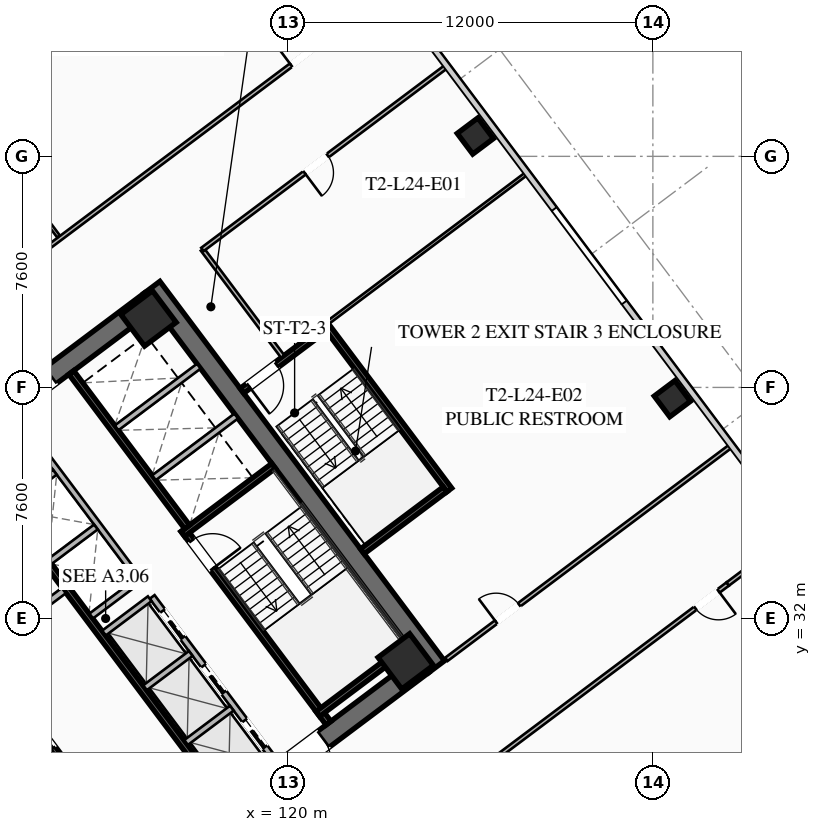
"""IFC4 building model, lengths in metres.
Left out: names, types, materials, properties, quantities, classifications, styles, units other than length and angle.
Written with IfcOpenShell. Run it as: python <this file> out.ifc"""

import sys

from ifc_helpers import new_model, si_unit, direction, frame, frame_2d, origin, origin_2d, place, context, subcontext, project, spatial, rectangle, hollow_rectangle, extrude, element, fill, save


model = new_model("IFC4")
c1 = context("Model", 3, precision=1e-05, world=origin(), true_north=direction((0.0, 1.0)))
c2 = subcontext(c1, "Body", "Model", "MODEL_VIEW")
j1 = project(units=[si_unit("LENGTHUNIT", "METRE"), si_unit("PLANEANGLEUNIT", "RADIAN")], contexts=[c1])
p1 = place(None, origin())
s1 = spatial("IfcSite", under=j1, at=p1, CompositionType="ELEMENT")
p2 = place(p1, origin())
s2 = spatial("IfcBuilding", under=s1, at=p2, CompositionType="ELEMENT")
p3 = place(p2, frame((0.0, 0.0, 92.05)))
s3 = spatial("IfcBuildingStorey", under=s2, at=p3, CompositionType="ELEMENT", Elevation=92.05)
for number, where, z_axis, x_axis in (
    (1, (112.476, 21.107, 0.0), (0.0, 0.0, 1.0), (-0.6, 0.8, 0.0)),
    (2, (115.524, 42.893, 0.0), (0.0, 0.0, 1.0), (0.6, -0.8, 0.0)),
):
    element("IfcWall", number, at=place(p3, frame(where, z_axis=z_axis, x_axis=x_axis)), inside=s3, PredefinedType="SHEAR", context=c2, shape_type="SweptSolid", body=[
        extrude(rectangle(XDim=15.6, YDim=0.65, at=frame_2d((7.8, 0.0))), origin(), (0.0, 0.0, 1.0), 3.55),
    ])
p4 = place(p3, frame((124.429, 30.478, 0.0), z_axis=(0.0, 0.0, 1.0), x_axis=(-0.799998028465, -0.600002628705, 0.0)))
e3 = element("IfcWall", 3, at=p4, inside=s3, PredefinedType="SHEAR", context=c2, shape_type="SweptSolid", body=[
    extrude(rectangle(XDim=14.86, YDim=0.65, at=frame_2d((7.43, 0.0))), origin(), (0.0, 0.0, 1.0), 3.55),
])
p5 = place(p4, frame((9.13, 0.0, 0.0)))
e4 = element("IfcOpeningElement", 4, at=p5, cuts=e3, PredefinedType="OPENING", context=c2, shape_type="SweptSolid", body=[
    extrude(rectangle(XDim=1.25, YDim=2.25, at=frame_2d((0.625, 1.125))), frame((0.0, 0.335, 0.0), z_axis=(0.0, -1.0, 0.0), x_axis=(1.0, 0.0, 0.0)), (0.0, 0.0, 1.0), 0.67),
])
p6 = place(p4, frame((4.08, 0.0, 0.0)))
e5 = element("IfcOpeningElement", 5, at=p6, cuts=e3, PredefinedType="OPENING", context=c2, shape_type="SweptSolid", body=[
    extrude(rectangle(XDim=1.25, YDim=2.25, at=frame_2d((0.625, 1.125))), frame((0.0, 0.335, 0.0), z_axis=(0.0, -1.0, 0.0), x_axis=(1.0, 0.0, 0.0)), (0.0, 0.0, 1.0), 0.67),
])
p7 = place(p3, frame((103.571, 33.522, 0.0), z_axis=(0.0, 0.0, 1.0), x_axis=(0.799998028465, 0.600002628705, 0.0)))
e6 = element("IfcWall", 6, at=p7, inside=s3, PredefinedType="SHEAR", context=c2, shape_type="SweptSolid", body=[
    extrude(rectangle(XDim=14.86, YDim=0.65, at=frame_2d((7.43, 0.0))), origin(), (0.0, 0.0, 1.0), 3.55),
])
p8 = place(p7, frame((4.48, 0.0, 0.0)))
e7 = element("IfcOpeningElement", 7, at=p8, cuts=e6, PredefinedType="OPENING", context=c2, shape_type="SweptSolid", body=[
    extrude(rectangle(XDim=1.25, YDim=2.25, at=frame_2d((0.625, 1.125))), frame((0.0, 0.335, 0.0), z_axis=(0.0, -1.0, 0.0), x_axis=(1.0, 0.0, 0.0)), (0.0, 0.0, 1.0), 0.67),
])
p9 = place(p7, frame((9.53, 0.0, 0.0)))
e8 = element("IfcOpeningElement", 8, at=p9, cuts=e6, PredefinedType="OPENING", context=c2, shape_type="SweptSolid", body=[
    extrude(rectangle(XDim=1.25, YDim=2.25, at=frame_2d((0.625, 1.125))), frame((0.0, 0.335, 0.0), z_axis=(0.0, -1.0, 0.0), x_axis=(1.0, 0.0, 0.0)), (0.0, 0.0, 1.0), 0.67),
])
for number, where, z_axis, x_axis in (
    (9, (123.87, 30.59, 0.0), (0.0, 0.0, 1.0), (0.8, 0.6, 0.0)),
    (10, (115.41, 41.87, 0.0), (0.0, 0.0, 1.0), (0.8, 0.6, 0.0)),
):
    element("IfcColumn", number, at=place(p3, frame(where, z_axis=z_axis, x_axis=x_axis)), inside=s3, PredefinedType="COLUMN", context=c2, shape_type="SweptSolid", body=[
        extrude(hollow_rectangle(XDim=1.3, YDim=1.3, WallThickness=0.05, at=origin_2d()), origin(), (0.0, 0.0, 1.0), 3.35),
    ])
for number, where, z_axis, x_axis in (
    (11, (132.64, 39.23, 0.0), (0.0, 0.0, 1.0), (0.8, 0.6, 0.0)),
    (12, (126.16, 47.87, 0.0), (0.0, 0.0, 1.0), (0.8, 0.6, 0.0)),
):
    element("IfcColumn", number, at=place(p3, frame(where, z_axis=z_axis, x_axis=x_axis)), inside=s3, PredefinedType="COLUMN", context=c2, shape_type="SweptSolid", body=[
        extrude(hollow_rectangle(XDim=0.85, YDim=0.85, WallThickness=0.035, at=origin_2d()), origin(), (0.0, 0.0, 1.0), 3.35),
    ])
p10 = place(p3, frame((116.56, 34.92, 0.0), z_axis=(0.0, 0.0, 1.0), x_axis=(0.600009827119, -0.799992629566, 0.0)))
e13 = element("IfcWall", 13, at=p10, inside=s3, PredefinedType="SHEAR", context=c2, shape_type="SweptSolid", body=[
    extrude(rectangle(XDim=7.95, YDim=0.2, at=frame_2d((3.975, 0.0))), origin(), (0.0, 0.0, 1.0), 3.35),
])
p11 = place(p10, frame((0.45, 0.0, 0.0)))
e14 = element("IfcOpeningElement", 14, at=p11, cuts=e13, PredefinedType="OPENING", context=c2, shape_type="SweptSolid", body=[
    extrude(rectangle(XDim=1.15, YDim=2.2, at=frame_2d((0.575, 1.1))), frame((0.0, 0.11, 0.0), z_axis=(0.0, -1.0, 0.0), x_axis=(1.0, 0.0, 0.0)), (0.0, 0.0, 1.0), 0.22),
])
for number, where, z_axis, x_axis in (
    (15, (116.54, 34.78, 0.0), (0.0, 0.0, 1.0), (0.8, 0.6, 0.0)),
    (16, (120.98, 28.86, 0.0), (0.0, 0.0, 1.0), (0.8, 0.6, 0.0)),
):
    element("IfcWall", number, at=place(p3, frame(where, z_axis=z_axis, x_axis=x_axis)), inside=s3, PredefinedType="SHEAR", context=c2, shape_type="SweptSolid", body=[
        extrude(rectangle(XDim=3.73, YDim=0.2, at=frame_2d((1.865, 0.0))), origin(), (0.0, 0.0, 1.0), 3.35),
    ])
p12 = place(p3, frame((117.938, 26.016, 0.0), z_axis=(0.0, 0.0, 1.0), x_axis=(-0.600005463273, 0.799995902516, 0.0)))
e17 = element("IfcWall", 17, at=p12, inside=s3, PredefinedType="SHEAR", context=c2, shape_type="SweptSolid", body=[
    extrude(rectangle(XDim=14.3, YDim=0.2, at=frame_2d((7.15, 0.0))), origin(), (0.0, 0.0, 1.0), 3.35),
])
p13 = place(p3, frame((110.104, 31.028, 0.0), z_axis=(0.0, 0.0, 1.0), x_axis=(0.800018601094, 0.59997519774, 0.0)))
e18 = element("IfcWall", 18, at=p13, inside=s3, PredefinedType="SOLIDWALL", context=c2, shape_type="SweptSolid", body=[
    extrude(rectangle(XDim=3.15, YDim=0.22, at=frame_2d((1.575, 0.0))), origin(), (0.0, 0.0, 1.0), 2.703),
])
p14 = place(p3, frame((115.13, 23.91, 0.0), z_axis=(0.0, 0.0, 1.0), x_axis=(-0.599975393228, 0.800018454488, 0.0)))
e19 = element("IfcWall", 19, at=p14, inside=s3, PredefinedType="SHEAR", context=c2, shape_type="SweptSolid", body=[
    extrude(rectangle(XDim=6.35, YDim=0.2, at=frame_2d((3.175, 0.0))), origin(), (0.0, 0.0, 1.0), 3.35),
])
p15 = place(p14, frame((4.775, 0.0, 0.0)))
e20 = element("IfcOpeningElement", 20, at=p15, cuts=e19, PredefinedType="OPENING", context=c2, shape_type="SweptSolid", body=[
    extrude(rectangle(XDim=1.3, YDim=2.25, at=frame_2d((0.65, 1.125))), frame((0.0, 0.11, 0.0), z_axis=(0.0, -1.0, 0.0), x_axis=(1.0, 0.0, 0.0)), (0.0, 0.0, 1.0), 0.22),
])
p16 = place(p14, frame((2.775, 0.0, 0.0)))
e21 = element("IfcOpeningElement", 21, at=p16, cuts=e19, PredefinedType="OPENING", context=c2, shape_type="SweptSolid", body=[
    extrude(rectangle(XDim=1.3, YDim=2.25, at=frame_2d((0.65, 1.125))), frame((0.0, 0.11, 0.0), z_axis=(0.0, -1.0, 0.0), x_axis=(1.0, 0.0, 0.0)), (0.0, 0.0, 1.0), 0.22),
])
p17 = place(p14, frame((0.575, 0.0, 0.0)))
e22 = element("IfcOpeningElement", 22, at=p17, cuts=e19, PredefinedType="OPENING", context=c2, shape_type="SweptSolid", body=[
    extrude(rectangle(XDim=1.3, YDim=2.25, at=frame_2d((0.65, 1.125))), frame((0.0, 0.11, 0.0), z_axis=(0.0, -1.0, 0.0), x_axis=(1.0, 0.0, 0.0)), (0.0, 0.0, 1.0), 0.22),
])
p18 = place(p3, frame((112.87, 40.09, 0.0), z_axis=(0.0, 0.0, 1.0), x_axis=(0.599975393228, -0.800018454488, 0.0)))
e23 = element("IfcWall", 23, at=p18, inside=s3, PredefinedType="SHEAR", context=c2, shape_type="SweptSolid", body=[
    extrude(rectangle(XDim=6.35, YDim=0.2, at=frame_2d((3.175, 0.0))), origin(), (0.0, 0.0, 1.0), 3.35),
])
for number, where, z_axis, x_axis in (
    (24, (115.59, 36.63, 0.0), (0.0, 0.0, 1.0), (0.8, 0.6, 0.0)),
    (25, (114.36, 38.27, 0.0), (0.0, 0.0, 1.0), (0.8, 0.6, 0.0)),
):
    element("IfcWall", number, at=place(p3, frame(where, z_axis=z_axis, x_axis=x_axis)), inside=s3, PredefinedType="SOLIDWALL", context=c2, shape_type="SweptSolid", body=[
        extrude(rectangle(XDim=3.38, YDim=0.2, at=frame_2d((1.69, 0.0))), origin(), (0.0, 0.0, 1.0), 3.35),
    ])
p19 = place(p3, frame((119.61, 27.27, 0.0), z_axis=(0.0, 0.0, 1.0), x_axis=(-0.600011488909, 0.79999138319, 0.0)))
e26 = element("IfcWall", 26, at=p19, inside=s3, PredefinedType="SOLIDWALL", context=c2, shape_type="SweptSolid", body=[
    extrude(rectangle(XDim=6.8, YDim=0.2, at=frame_2d((3.4, 0.0))), origin(), (0.0, 0.0, 1.0), 3.35),
])
p20 = place(p19, frame((0.625, 0.0, 0.0)))
e27 = element("IfcOpeningElement", 27, at=p20, cuts=e26, PredefinedType="OPENING", context=c2, shape_type="SweptSolid", body=[
    extrude(rectangle(XDim=1.1, YDim=2.2, at=frame_2d((0.55, 1.1))), frame((0.0, 0.11, 0.0), z_axis=(0.0, -1.0, 0.0), x_axis=(1.0, 0.0, 0.0)), (0.0, 0.0, 1.0), 0.22),
])
p21 = place(p19, frame((2.875, 0.0, 0.0)))
e28 = element("IfcOpeningElement", 28, at=p21, cuts=e26, PredefinedType="OPENING", context=c2, shape_type="SweptSolid", body=[
    extrude(rectangle(XDim=1.1, YDim=2.2, at=frame_2d((0.55, 1.1))), frame((0.0, 0.11, 0.0), z_axis=(0.0, -1.0, 0.0), x_axis=(1.0, 0.0, 0.0)), (0.0, 0.0, 1.0), 0.22),
])
p22 = place(p19, frame((5.125, 0.0, 0.0)))
e29 = element("IfcOpeningElement", 29, at=p22, cuts=e26, PredefinedType="OPENING", context=c2, shape_type="SweptSolid", body=[
    extrude(rectangle(XDim=1.1, YDim=2.2, at=frame_2d((0.55, 1.1))), frame((0.0, 0.11, 0.0), z_axis=(0.0, -1.0, 0.0), x_axis=(1.0, 0.0, 0.0)), (0.0, 0.0, 1.0), 0.22),
])
p23 = place(p3, frame((116.646, 27.922, 0.0), z_axis=(0.0, 0.0, 1.0), x_axis=(0.8, 0.6, 0.0)))
e30 = element("IfcWall", 30, at=p23, inside=s3, PredefinedType="SOLIDWALL", context=c2, shape_type="SweptSolid", body=[
    extrude(rectangle(XDim=1.88, YDim=0.2, at=frame_2d((0.94, 0.0))), origin(), (0.0, 0.0, 1.0), 3.35),
])
p24 = place(p3, frame((115.296, 29.722, 0.0), z_axis=(0.0, 0.0, 1.0), x_axis=(0.799984418148, 0.600020775241, 0.0)))
e31 = element("IfcWall", 31, at=p24, inside=s3, PredefinedType="SOLIDWALL", context=c2, shape_type="SweptSolid", body=[
    extrude(rectangle(XDim=1.88, YDim=0.2, at=frame_2d((0.94, 0.0))), origin(), (0.0, 0.0, 1.0), 3.35),
])
p25 = place(p3, frame((113.946, 31.522, 0.0), z_axis=(0.0, 0.0, 1.0), x_axis=(0.8, 0.6, 0.0)))
e32 = element("IfcWall", 32, at=p25, inside=s3, PredefinedType="SOLIDWALL", context=c2, shape_type="SweptSolid", body=[
    extrude(rectangle(XDim=1.88, YDim=0.2, at=frame_2d((0.94, 0.0))), origin(), (0.0, 0.0, 1.0), 3.35),
])
p26 = place(p3, frame((115.11, 33.27, 0.0), z_axis=(0.0, 0.0, 1.0), x_axis=(-0.600011488909, 0.79999138319, 0.0)))
e33 = element("IfcWall", 33, at=p26, inside=s3, PredefinedType="SOLIDWALL", context=c2, shape_type="SweptSolid", body=[
    extrude(rectangle(XDim=6.8, YDim=0.2, at=frame_2d((3.4, 0.0))), origin(), (0.0, 0.0, 1.0), 3.35),
])
p27 = place(p3, frame((113.526, 32.082, 0.0), z_axis=(0.0, 0.0, 1.0), x_axis=(0.800046745961, 0.599937666993, 0.0)))
e34 = element("IfcWall", 34, at=p27, inside=s3, PredefinedType="SOLIDWALL", context=c2, shape_type="SweptSolid", body=[
    extrude(rectangle(XDim=1.88, YDim=0.2, at=frame_2d((0.94, 0.0))), origin(), (0.0, 0.0, 1.0), 3.35),
])
p28 = place(p3, frame((112.176, 33.882, 0.0), z_axis=(0.0, 0.0, 1.0), x_axis=(0.8, 0.6, 0.0)))
e35 = element("IfcWall", 35, at=p28, inside=s3, PredefinedType="SOLIDWALL", context=c2, shape_type="SweptSolid", body=[
    extrude(rectangle(XDim=1.88, YDim=0.2, at=frame_2d((0.94, 0.0))), origin(), (0.0, 0.0, 1.0), 3.35),
])
p29 = place(p3, frame((110.826, 35.682, 0.0), z_axis=(0.0, 0.0, 1.0), x_axis=(0.799984418148, 0.600020775241, 0.0)))
e36 = element("IfcWall", 36, at=p29, inside=s3, PredefinedType="SOLIDWALL", context=c2, shape_type="SweptSolid", body=[
    extrude(rectangle(XDim=1.88, YDim=0.2, at=frame_2d((0.94, 0.0))), origin(), (0.0, 0.0, 1.0), 3.35),
])
p30 = place(p3, frame((125.304, 36.228, 0.0), z_axis=(0.0, 0.0, 1.0), x_axis=(-0.59998851072, 0.800008616831, 0.0)))
e37 = element("IfcWall", 37, at=p30, inside=s3, PredefinedType="SHEAR", context=c2, shape_type="SweptSolid", body=[
    extrude(rectangle(XDim=6.8, YDim=0.2, at=frame_2d((3.4, 0.0))), origin(), (0.0, 0.0, 1.0), 3.35),
])
p31 = place(p3, frame((121.204, 41.528, 0.0), z_axis=(0.0, 0.0, 1.0), x_axis=(-0.800017232136, -0.599977023131, 0.0)))
e38 = element("IfcWall", 38, at=p31, inside=s3, PredefinedType="SHEAR", context=c2, shape_type="SweptSolid", body=[
    extrude(rectangle(XDim=3.4, YDim=0.2, at=frame_2d((1.7, 0.0))), origin(), (0.0, 0.0, 1.0), 3.35),
])
p32 = place(p31, frame((1.975, 0.0, 0.0)))
e39 = element("IfcOpeningElement", 39, at=p32, cuts=e38, PredefinedType="OPENING", context=c2, shape_type="SweptSolid", body=[
    extrude(rectangle(XDim=1.15, YDim=2.2, at=frame_2d((0.575, 1.1))), frame((0.0, 0.11, 0.0), z_axis=(0.0, -1.0, 0.0), x_axis=(1.0, 0.0, 0.0)), (0.0, 0.0, 1.0), 0.22),
])
p33 = place(p3, frame((122.444, 34.208, 0.0), z_axis=(0.0, 0.0, 1.0), x_axis=(0.79999138319, 0.600011488909, 0.0)))
e40 = element("IfcWall", 40, at=p33, inside=s3, PredefinedType="SHEAR", context=c2, shape_type="SweptSolid", body=[
    extrude(rectangle(XDim=3.4, YDim=0.2, at=frame_2d((1.7, 0.0))), origin(), (0.0, 0.0, 1.0), 3.35),
])
p34 = place(p3, frame((119.824, 40.618, 0.0), z_axis=(0.0, 0.0, 1.0), x_axis=(-0.599982243973, 0.800013316712, 0.0)))
e41 = element("IfcWall", 41, at=p34, inside=s3, PredefinedType="PARTITIONING", context=c2, shape_type="SweptSolid", body=[
    extrude(rectangle(XDim=4.4, YDim=0.135, at=frame_2d((2.2, 0.0))), origin(), (0.0, 0.0, 1.0), 2.703),
])
p35 = place(p3, frame((98.316, 33.862, 0.0), z_axis=(0.0, 0.0, 1.0), x_axis=(0.8000041147, 0.599994513695, 0.0)))
e42 = element("IfcWall", 42, at=p35, inside=s3, PredefinedType="PARTITIONING", context=c2, shape_type="SweptSolid", body=[
    extrude(rectangle(XDim=28.48, YDim=0.135, at=frame_2d((14.24, 0.0))), origin(), (0.0, 0.0, 1.0), 2.703),
])
p36 = place(p35, frame((0.3, 0.0, 0.0)))
e43 = element("IfcOpeningElement", 43, at=p36, cuts=e42, PredefinedType="OPENING", context=c2, shape_type="SweptSolid", body=[
    extrude(rectangle(XDim=0.95, YDim=2.05, at=frame_2d((0.475, 1.025))), frame((0.0, 0.077, 0.0), z_axis=(0.0, -1.0, 0.0), x_axis=(1.0, 0.0, 0.0)), (0.0, 0.0, 1.0), 0.155),
])
p37 = place(p35, frame((7.195, 0.0, 0.0)))
e44 = element("IfcOpeningElement", 44, at=p37, cuts=e42, PredefinedType="OPENING", context=c2, shape_type="SweptSolid", body=[
    extrude(rectangle(XDim=0.95, YDim=2.05, at=frame_2d((0.475, 1.025))), frame((0.0, 0.077, 0.0), z_axis=(0.0, -1.0, 0.0), x_axis=(1.0, 0.0, 0.0)), (0.0, 0.0, 1.0), 0.155),
])
p38 = place(p35, frame((11.222, 0.0, 0.0)))
e45 = element("IfcOpeningElement", 45, at=p38, cuts=e42, PredefinedType="OPENING", context=c2, shape_type="SweptSolid", body=[
    extrude(rectangle(XDim=0.95, YDim=2.05, at=frame_2d((0.475, 1.025))), frame((0.0, 0.077, 0.0), z_axis=(0.0, -1.0, 0.0), x_axis=(1.0, 0.0, 0.0)), (0.0, 0.0, 1.0), 0.155),
])
p39 = place(p35, frame((27.23, 0.0, 0.0)))
e46 = element("IfcOpeningElement", 46, at=p39, cuts=e42, PredefinedType="OPENING", context=c2, shape_type="SweptSolid", body=[
    extrude(rectangle(XDim=0.95, YDim=2.05, at=frame_2d((0.475, 1.025))), frame((0.0, 0.077, 0.0), z_axis=(0.0, -1.0, 0.0), x_axis=(1.0, 0.0, 0.0)), (0.0, 0.0, 1.0), 0.155),
])
p40 = place(p3, frame((112.452, 44.564, 0.0), z_axis=(0.0, 0.0, 1.0), x_axis=(-0.6, 0.8, 0.0)))
e47 = element("IfcWall", 47, at=p40, inside=s3, PredefinedType="PARTITIONING", context=c2, shape_type="SweptSolid", body=[
    extrude(rectangle(XDim=8.75, YDim=0.11, at=frame_2d((4.375, 0.0))), origin(), (0.0, 0.0, 1.0), 2.703),
])
p41 = place(p3, frame((134.462, 33.134, 0.0), z_axis=(0.0, 0.0, 1.0), x_axis=(-0.799996913945, -0.600004114717, 0.0)))
e48 = element("IfcWall", 48, at=p41, inside=s3, PredefinedType="PARTITIONING", context=c2, shape_type="SweptSolid", body=[
    extrude(rectangle(XDim=28.48, YDim=0.135, at=frame_2d((14.24, 0.0))), origin(), (0.0, 0.0, 1.0), 2.703),
])
p42 = place(p41, frame((27.15, 0.0, 0.0)))
e49 = element("IfcOpeningElement", 49, at=p42, cuts=e48, PredefinedType="OPENING", context=c2, shape_type="SweptSolid", body=[
    extrude(rectangle(XDim=0.95, YDim=2.05, at=frame_2d((0.475, 1.025))), frame((0.0, 0.077, 0.0), z_axis=(0.0, -1.0, 0.0), x_axis=(1.0, 0.0, 0.0)), (0.0, 0.0, 1.0), 0.155),
])
p43 = place(p41, frame((0.38, 0.0, 0.0)))
e50 = element("IfcOpeningElement", 50, at=p43, cuts=e48, PredefinedType="OPENING", context=c2, shape_type="SweptSolid", body=[
    extrude(rectangle(XDim=0.95, YDim=2.05, at=frame_2d((0.475, 1.025))), frame((0.0, 0.077, 0.0), z_axis=(0.0, -1.0, 0.0), x_axis=(1.0, 0.0, 0.0)), (0.0, 0.0, 1.0), 0.155),
])
p44 = place(p3, frame((134.462, 33.134, 0.0), z_axis=(0.0, 0.0, 1.0), x_axis=(0.8000207031, 0.599972394874, 0.0)))
e51 = element("IfcWall", 51, at=p44, inside=s3, PredefinedType="PARTITIONING", context=c2, shape_type="SweptSolid", body=[
    extrude(rectangle(XDim=2.83, YDim=0.135, at=frame_2d((1.415, 0.0))), origin(), (0.0, 0.0, 1.0), 2.703),
])
p45 = place(p3, frame((125.224, 50.168, 0.0), z_axis=(0.0, 0.0, 1.0), x_axis=(-0.8, -0.6, 0.0)))
e52 = element("IfcWall", 52, at=p45, inside=s3, PredefinedType="PARTITIONING", context=c2, shape_type="SweptSolid", body=[
    extrude(rectangle(XDim=10.05, YDim=0.135, at=frame_2d((5.025, 0.0))), origin(), (0.0, 0.0, 1.0), 2.703),
])
p46 = place(p45, frame((4.9, 0.0, 0.0)))
e53 = element("IfcOpeningElement", 53, at=p46, cuts=e52, PredefinedType="OPENING", context=c2, shape_type="SweptSolid", body=[
    extrude(rectangle(XDim=0.95, YDim=2.05, at=frame_2d((0.475, 1.025))), frame((0.0, 0.077, 0.0), z_axis=(0.0, -1.0, 0.0), x_axis=(1.0, 0.0, 0.0)), (0.0, 0.0, 1.0), 0.155),
])
p47 = place(p3, frame((125.208, 30.656, 0.0), z_axis=(0.0, 0.0, 1.0), x_axis=(0.8, 0.6, 0.0)))
e54 = element("IfcWall", 54, at=p47, inside=s3, PredefinedType="PARTITIONING", context=c2, shape_type="SweptSolid", body=[
    extrude(rectangle(XDim=11.72, YDim=0.135, at=frame_2d((5.86, 0.0))), origin(), (0.0, 0.0, 1.0), 2.703),
])
p48 = place(p47, frame((2.045, 0.0, 0.0)))
e55 = element("IfcOpeningElement", 55, at=p48, cuts=e54, PredefinedType="OPENING", context=c2, shape_type="SweptSolid", body=[
    extrude(rectangle(XDim=0.95, YDim=2.05, at=frame_2d((0.475, 1.025))), frame((0.0, 0.077, 0.0), z_axis=(0.0, -1.0, 0.0), x_axis=(1.0, 0.0, 0.0)), (0.0, 0.0, 1.0), 0.155),
])
p49 = place(p3, frame((127.864, 46.648, 0.0), z_axis=(0.0, 0.0, 1.0), x_axis=(-0.800007145523, -0.599990472518, 0.0)))
e56 = element("IfcWall", 56, at=p49, inside=s3, PredefinedType="PARTITIONING", context=c2, shape_type="SweptSolid", body=[
    extrude(rectangle(XDim=8.2, YDim=0.11, at=frame_2d((4.1, 0.0))), origin(), (0.0, 0.0, 1.0), 2.703),
])
p50 = place(p6, origin())
e57 = element("IfcDoor", 57, at=p50, inside=s3, OperationType="SINGLE_SWING_RIGHT", PredefinedType="DOOR", context=c2, shape_type="SweptSolid", body=[
    extrude(rectangle(XDim=1.25, YDim=2.25, at=frame_2d((0.625, 1.125))), frame((0.0, 0.025, 0.0), z_axis=(0.0, -1.0, 0.0), x_axis=(1.0, 0.0, 0.0)), (0.0, 0.0, 1.0), 0.05),
])
fill(e5, e57)
p51 = place(p11, origin())
e58 = element("IfcDoor", 58, at=p51, inside=s3, OperationType="SINGLE_SWING_RIGHT", PredefinedType="DOOR", context=c2, shape_type="SweptSolid", body=[
    extrude(rectangle(XDim=1.15, YDim=2.2, at=frame_2d((0.575, 1.1))), frame((0.0, 0.025, 0.0), z_axis=(0.0, -1.0, 0.0), x_axis=(1.0, 0.0, 0.0)), (0.0, 0.0, 1.0), 0.05),
])
fill(e14, e58)
p52 = place(p32, origin())
e59 = element("IfcDoor", 59, at=p52, inside=s3, OperationType="SINGLE_SWING_RIGHT", PredefinedType="DOOR", context=c2, shape_type="SweptSolid", body=[
    extrude(rectangle(XDim=1.15, YDim=2.2, at=frame_2d((0.575, 1.1))), frame((0.0, 0.025, 0.0), z_axis=(0.0, -1.0, 0.0), x_axis=(1.0, 0.0, 0.0)), (0.0, 0.0, 1.0), 0.05),
])
fill(e39, e59)
p53 = place(p39, origin())
e60 = element("IfcDoor", 60, at=p53, inside=s3, OperationType="SINGLE_SWING_LEFT", PredefinedType="DOOR", context=c2, shape_type="SweptSolid", body=[
    extrude(rectangle(XDim=0.95, YDim=2.05, at=frame_2d((0.475, 1.025))), frame((0.0, 0.025, 0.0), z_axis=(0.0, -1.0, 0.0), x_axis=(1.0, 0.0, 0.0)), (0.0, 0.0, 1.0), 0.05),
])
fill(e46, e60)
p54 = place(p43, origin())
e61 = element("IfcDoor", 61, at=p54, inside=s3, OperationType="SINGLE_SWING_LEFT", PredefinedType="DOOR", context=c2, shape_type="SweptSolid", body=[
    extrude(rectangle(XDim=0.95, YDim=2.05, at=frame_2d((0.475, 1.025))), frame((0.0, 0.025, 0.0), z_axis=(0.0, -1.0, 0.0), x_axis=(1.0, 0.0, 0.0)), (0.0, 0.0, 1.0), 0.05),
])
fill(e50, e61)
p55 = place(p46, origin())
e62 = element("IfcDoor", 62, at=p55, inside=s3, OperationType="SINGLE_SWING_RIGHT", PredefinedType="DOOR", context=c2, shape_type="SweptSolid", body=[
    extrude(rectangle(XDim=0.95, YDim=2.05, at=frame_2d((0.475, 1.025))), frame((0.0, 0.025, 0.0), z_axis=(0.0, -1.0, 0.0), x_axis=(1.0, 0.0, 0.0)), (0.0, 0.0, 1.0), 0.05),
])
fill(e53, e62)
p56 = place(p48, origin())
e63 = element("IfcDoor", 63, at=p56, inside=s3, OperationType="SINGLE_SWING_LEFT", PredefinedType="DOOR", context=c2, shape_type="SweptSolid", body=[
    extrude(rectangle(XDim=0.95, YDim=2.05, at=frame_2d((0.475, 1.025))), frame((0.0, 0.025, 0.0), z_axis=(0.0, -1.0, 0.0), x_axis=(1.0, 0.0, 0.0)), (0.0, 0.0, 1.0), 0.05),
])
fill(e55, e63)
p57 = place(p15, origin())
e64 = element("IfcDoor", 64, at=p57, inside=s3, OperationType="SLIDING_TO_LEFT", PredefinedType="DOOR", context=c2, shape_type="SweptSolid", body=[
    extrude(rectangle(XDim=1.3, YDim=2.25, at=frame_2d((0.65, 1.125))), frame((0.0, 0.025, 0.0), z_axis=(0.0, -1.0, 0.0), x_axis=(1.0, 0.0, 0.0)), (0.0, 0.0, 1.0), 0.05),
])
fill(e20, e64)
p58 = place(p20, origin())
e65 = element("IfcDoor", 65, at=p58, inside=s3, OperationType="SLIDING_TO_LEFT", PredefinedType="DOOR", context=c2, shape_type="SweptSolid", body=[
    extrude(rectangle(XDim=1.1, YDim=2.2, at=frame_2d((0.55, 1.1))), frame((0.0, 0.025, 0.0), z_axis=(0.0, -1.0, 0.0), x_axis=(1.0, 0.0, 0.0)), (0.0, 0.0, 1.0), 0.05),
])
fill(e27, e65)
p59 = place(p21, origin())
e66 = element("IfcDoor", 66, at=p59, inside=s3, OperationType="SLIDING_TO_LEFT", PredefinedType="DOOR", context=c2, shape_type="SweptSolid", body=[
    extrude(rectangle(XDim=1.1, YDim=2.2, at=frame_2d((0.55, 1.1))), frame((0.0, 0.025, 0.0), z_axis=(0.0, -1.0, 0.0), x_axis=(1.0, 0.0, 0.0)), (0.0, 0.0, 1.0), 0.05),
])
fill(e28, e66)
p60 = place(p22, origin())
e67 = element("IfcDoor", 67, at=p60, inside=s3, OperationType="SLIDING_TO_LEFT", PredefinedType="DOOR", context=c2, shape_type="SweptSolid", body=[
    extrude(rectangle(XDim=1.1, YDim=2.2, at=frame_2d((0.55, 1.1))), frame((0.0, 0.025, 0.0), z_axis=(0.0, -1.0, 0.0), x_axis=(1.0, 0.0, 0.0)), (0.0, 0.0, 1.0), 0.05),
])
fill(e29, e67)
save(model, sys.argv[1])
